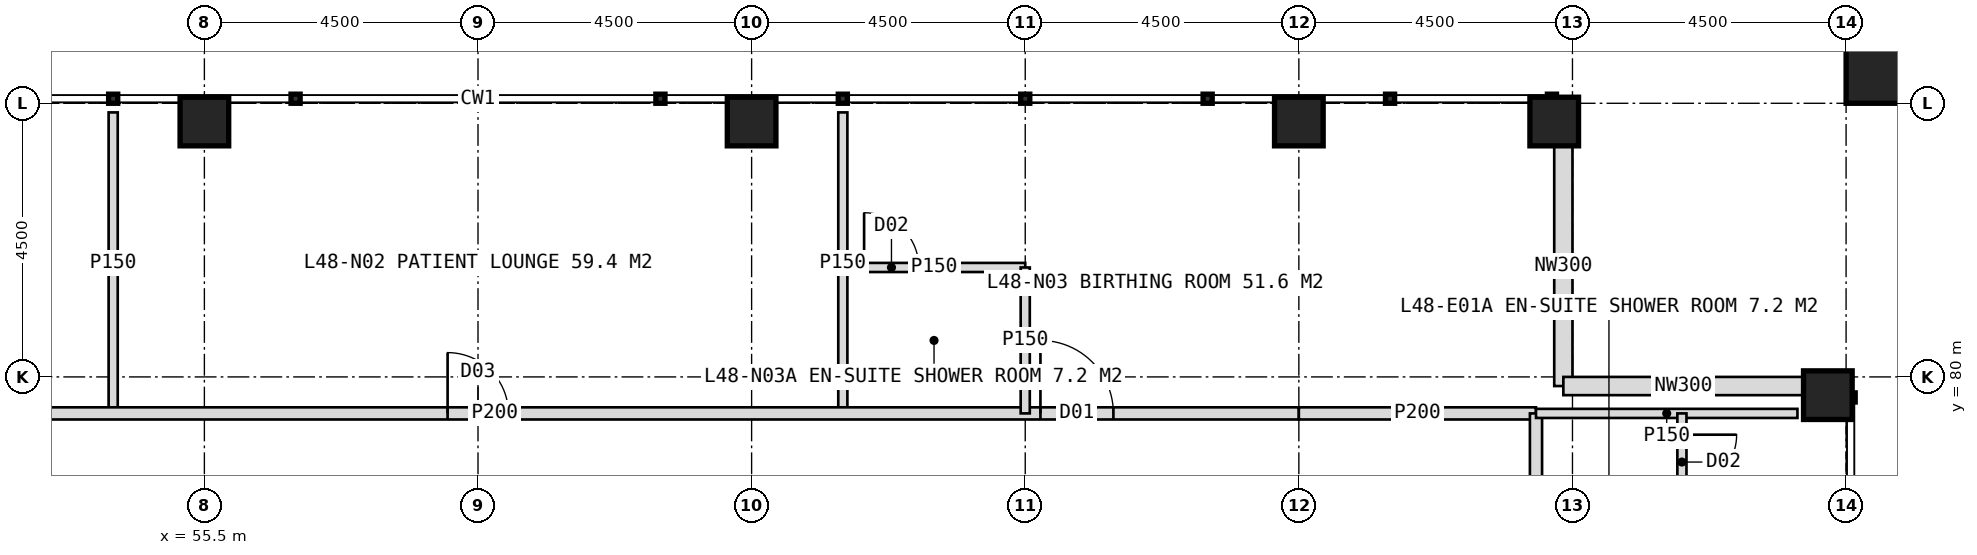
"""IFC4 building model, lengths in metres.
Left out: names, types, materials, properties, quantities, classifications, styles, units other than length and angle.
Written with IfcOpenShell. Run it as: python <this file> out.ifc"""

import sys

from ifc_helpers import new_model, si_unit, direction, frame, frame_2d, origin, origin_2d, place, context, subcontext, project, spatial, rectangle, hollow_rectangle, extrude, element, fill, save


model = new_model("IFC4")
c1 = context("Model", 3, precision=1e-05, world=origin(), true_north=direction((0.0, 1.0)))
c2 = subcontext(c1, "Body", "Model", "MODEL_VIEW")
j1 = project(units=[si_unit("LENGTHUNIT", "METRE"), si_unit("PLANEANGLEUNIT", "RADIAN")], contexts=[c1])
p1 = place(None, origin())
s1 = spatial("IfcSite", under=j1, at=p1, CompositionType="ELEMENT")
p2 = place(p1, origin())
s2 = spatial("IfcBuilding", under=s1, at=p2, CompositionType="ELEMENT")
p3 = place(p2, frame((0.0, 0.0, 201.0)))
s3 = spatial("IfcBuildingStorey", under=s2, at=p3, CompositionType="ELEMENT", Elevation=201.0)
for number, where, z_axis, x_axis in (
    (1, (55.5, 84.2, 0.0), (0.0, 0.0, 1.0), (1.0, 0.0, 0.0)),
    (2, (64.5, 84.2, 0.0), (0.0, 0.0, 1.0), (1.0, 0.0, 0.0)),
    (3, (73.5, 84.2, 0.0), (0.0, 0.0, 1.0), (1.0, 0.0, 0.0)),
    (4, (77.7, 84.2, 0.0), (0.0, 0.0, 1.0), (1.0, 0.0, 0.0)),
    (5, (82.2, 79.7, 0.0), (0.0, 0.0, 1.0), (1.0, 0.0, 0.0)),
):
    element("IfcColumn", number, at=place(p3, frame(where, z_axis=z_axis, x_axis=x_axis)), inside=s3, PredefinedType="COLUMN", context=c2, shape_type="SweptSolid", body=[
        extrude(hollow_rectangle(XDim=0.8, YDim=0.8, WallThickness=0.08, at=origin_2d()), origin(), (0.0, 0.0, 1.0), 4.0),
    ])
p4 = place(p3, frame((83.1, 85.1, 0.0), z_axis=(0.0, 0.0, 1.0), x_axis=(1.0, 0.0, 0.0)))
e6 = element("IfcColumn", 6, at=p4, inside=s3, PredefinedType="COLUMN", context=c2, shape_type="SweptSolid", body=[
    extrude(hollow_rectangle(XDim=1.2, YDim=1.2, WallThickness=0.07, at=origin_2d()), origin(), (0.0, 0.0, 1.0), 4.0),
])
for number, where, z_axis, x_axis in (
    (7, (77.85, 83.8, 0.0), (0.0, 0.0, 1.0), (0.0, -1.0, 0.0)),
    (8, (77.85, 79.85, 0.0), (0.0, 0.0, 1.0), (1.0, 0.0, 0.0)),
):
    element("IfcWall", number, at=place(p3, frame(where, z_axis=z_axis, x_axis=x_axis)), inside=s3, PredefinedType="ELEMENTEDWALL", context=c2, shape_type="SweptSolid", body=[
        extrude(rectangle(XDim=3.95, YDim=0.3, at=frame_2d((1.975, 0.0))), origin(), (0.0, 0.0, 1.0), 2.85),
    ])
for number, where, z_axis, x_axis in (
    (9, (54.0, 79.4, 0.0), (0.0, 0.0, 1.0), (0.0, 1.0, 0.0)),
    (10, (66.0, 79.4, 0.0), (0.0, 0.0, 1.0), (0.0, 1.0, 0.0)),
):
    element("IfcWall", number, at=place(p3, frame(where, z_axis=z_axis, x_axis=x_axis)), inside=s3, PredefinedType="PARTITIONING", context=c2, shape_type="SweptSolid", body=[
        extrude(rectangle(XDim=4.95, YDim=0.15, at=frame_2d((2.475, 0.0))), origin(), (0.0, 0.0, 1.0), 3.75),
    ])
p5 = place(p3, frame((47.05, 79.4, 0.0), z_axis=(0.0, 0.0, 1.0), x_axis=(1.0, 0.0, 0.0)))
e11 = element("IfcWall", 11, at=p5, inside=s3, PredefinedType="PARTITIONING", context=c2, shape_type="SweptSolid", body=[
    extrude(rectangle(XDim=26.45, YDim=0.2, at=frame_2d((13.225, 0.0))), origin(), (0.0, 0.0, 1.0), 3.75),
])
p6 = place(p5, frame((12.45, 0.0, 0.0)))
e12 = element("IfcOpeningElement", 12, at=p6, cuts=e11, PredefinedType="OPENING", context=c2, shape_type="SweptSolid", body=[
    extrude(rectangle(XDim=1.0, YDim=2.1, at=frame_2d((0.5, 1.05))), frame((0.0, 0.11, 0.0), z_axis=(0.0, -1.0, 0.0), x_axis=(1.0, 0.0, 0.0)), (0.0, 0.0, 1.0), 0.22),
])
p7 = place(p5, frame((22.2, 0.0, 0.0)))
e13 = element("IfcOpeningElement", 13, at=p7, cuts=e11, PredefinedType="OPENING", context=c2, shape_type="SweptSolid", body=[
    extrude(rectangle(XDim=1.2, YDim=2.2, at=frame_2d((0.6, 1.1))), frame((0.0, 0.11, 0.0), z_axis=(0.0, -1.0, 0.0), x_axis=(1.0, 0.0, 0.0)), (0.0, 0.0, 1.0), 0.22),
])
p8 = place(p3, frame((73.5, 79.4, 0.0), z_axis=(0.0, 0.0, 1.0), x_axis=(1.0, 0.0, 0.0)))
e14 = element("IfcWall", 14, at=p8, inside=s3, PredefinedType="PARTITIONING", context=c2, shape_type="SweptSolid", body=[
    extrude(rectangle(XDim=3.9, YDim=0.2, at=frame_2d((1.95, 0.0))), origin(), (0.0, 0.0, 1.0), 2.85),
])
p9 = place(p3, frame((66.0, 81.8, 0.0), z_axis=(0.0, 0.0, 1.0), x_axis=(1.0, 0.0, 0.0)))
e15 = element("IfcWall", 15, at=p9, inside=s3, PredefinedType="PARTITIONING", context=c2, shape_type="SweptSolid", body=[
    extrude(rectangle(XDim=3.0, YDim=0.15, at=frame_2d((1.5, 0.0))), origin(), (0.0, 0.0, 1.0), 3.75),
])
p10 = place(p9, frame((0.35, 0.0, 0.0)))
e16 = element("IfcOpeningElement", 16, at=p10, cuts=e15, PredefinedType="OPENING", context=c2, shape_type="SweptSolid", body=[
    extrude(rectangle(XDim=0.9, YDim=2.1, at=frame_2d((0.45, 1.05))), frame((0.0, 0.085, 0.0), z_axis=(0.0, -1.0, 0.0), x_axis=(1.0, 0.0, 0.0)), (0.0, 0.0, 1.0), 0.17),
])
p11 = place(p3, frame((69.0, 79.4, 0.0), z_axis=(0.0, 0.0, 1.0), x_axis=(0.0, 1.0, 0.0)))
e17 = element("IfcWall", 17, at=p11, inside=s3, PredefinedType="PARTITIONING", context=c2, shape_type="SweptSolid", body=[
    extrude(rectangle(XDim=2.4, YDim=0.15, at=frame_2d((1.2, 0.0))), origin(), (0.0, 0.0, 1.0), 3.75),
])
p12 = place(p3, frame((77.4, 79.4, 0.0), z_axis=(0.0, 0.0, 1.0), x_axis=(0.0, -1.0, 0.0)))
e18 = element("IfcWall", 18, at=p12, inside=s3, PredefinedType="PARTITIONING", context=c2, shape_type="SweptSolid", body=[
    extrude(rectangle(XDim=4.45, YDim=0.2, at=frame_2d((2.225, 0.0))), origin(), (0.0, 0.0, 1.0), 2.85),
])
p13 = place(p12, frame((3.25, 0.0, 0.0)))
e19 = element("IfcOpeningElement", 19, at=p13, cuts=e18, PredefinedType="OPENING", context=c2, shape_type="SweptSolid", body=[
    extrude(rectangle(XDim=1.2, YDim=2.2, at=frame_2d((0.6, 1.1))), frame((0.0, 0.11, 0.0), z_axis=(0.0, -1.0, 0.0), x_axis=(1.0, 0.0, 0.0)), (0.0, 0.0, 1.0), 0.22),
])
p14 = place(p3, frame((77.4, 79.4, 0.0), z_axis=(0.0, 0.0, 1.0), x_axis=(1.0, 0.0, 0.0)))
e20 = element("IfcWall", 20, at=p14, inside=s3, PredefinedType="PARTITIONING", context=c2, shape_type="SweptSolid", body=[
    extrude(rectangle(XDim=4.3, YDim=0.15, at=frame_2d((2.15, 0.0))), origin(), (0.0, 0.0, 1.0), 2.85),
])
p15 = place(p3, frame((79.8, 79.4, 0.0), z_axis=(0.0, 0.0, 1.0), x_axis=(0.0, -1.0, 0.0)))
e21 = element("IfcWall", 21, at=p15, inside=s3, PredefinedType="PARTITIONING", context=c2, shape_type="SweptSolid", body=[
    extrude(rectangle(XDim=3.0, YDim=0.15, at=frame_2d((1.5, 0.0))), origin(), (0.0, 0.0, 1.0), 3.75),
])
p16 = place(p15, frame((0.35, 0.0, 0.0)))
e22 = element("IfcOpeningElement", 22, at=p16, cuts=e21, PredefinedType="OPENING", context=c2, shape_type="SweptSolid", body=[
    extrude(rectangle(XDim=0.9, YDim=2.1, at=frame_2d((0.45, 1.05))), frame((0.0, 0.085, 0.0), z_axis=(0.0, -1.0, 0.0), x_axis=(1.0, 0.0, 0.0)), (0.0, 0.0, 1.0), 0.17),
])
p17 = place(p6, origin())
e23 = element("IfcDoor", 23, at=p17, inside=s3, OperationType="SINGLE_SWING_LEFT", PredefinedType="DOOR", context=c2, shape_type="SweptSolid", body=[
    extrude(rectangle(XDim=1.0, YDim=2.1, at=frame_2d((0.5, 1.05))), frame((0.0, 0.025, 0.0), z_axis=(0.0, -1.0, 0.0), x_axis=(1.0, 0.0, 0.0)), (0.0, 0.0, 1.0), 0.05),
])
fill(e12, e23)
p18 = place(p7, origin())
e24 = element("IfcDoor", 24, at=p18, inside=s3, OperationType="SINGLE_SWING_LEFT", PredefinedType="DOOR", context=c2, shape_type="SweptSolid", body=[
    extrude(rectangle(XDim=1.2, YDim=2.2, at=frame_2d((0.6, 1.1))), frame((0.0, 0.025, 0.0), z_axis=(0.0, -1.0, 0.0), x_axis=(1.0, 0.0, 0.0)), (0.0, 0.0, 1.0), 0.05),
])
fill(e13, e24)
p19 = place(p10, origin())
e25 = element("IfcDoor", 25, at=p19, inside=s3, OperationType="SINGLE_SWING_LEFT", PredefinedType="DOOR", context=c2, shape_type="SweptSolid", body=[
    extrude(rectangle(XDim=0.9, YDim=2.1, at=frame_2d((0.45, 1.05))), frame((0.0, 0.025, 0.0), z_axis=(0.0, -1.0, 0.0), x_axis=(1.0, 0.0, 0.0)), (0.0, 0.0, 1.0), 0.05),
])
fill(e16, e25)
p20 = place(p16, origin())
e26 = element("IfcDoor", 26, at=p20, inside=s3, OperationType="SINGLE_SWING_LEFT", PredefinedType="DOOR", context=c2, shape_type="SweptSolid", body=[
    extrude(rectangle(XDim=0.9, YDim=2.1, at=frame_2d((0.45, 1.05))), frame((0.0, 0.025, 0.0), z_axis=(0.0, -1.0, 0.0), x_axis=(1.0, 0.0, 0.0)), (0.0, 0.0, 1.0), 0.05),
])
fill(e22, e26)
save(model, sys.argv[1])
